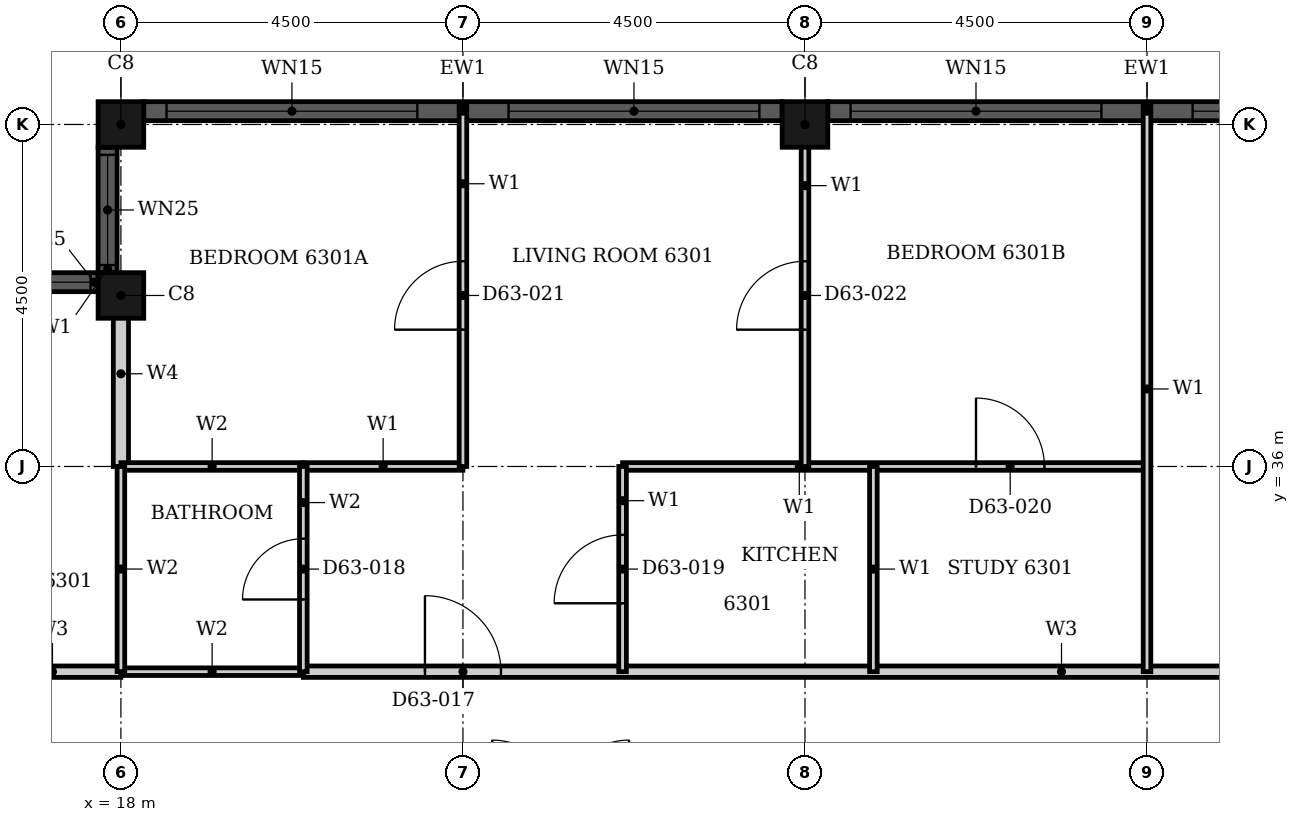
"""IFC4 building model, lengths in metres.
Left out: names, types, materials, properties, quantities, classifications, styles, units other than length and angle.
Written with IfcOpenShell. Run it as: python <this file> out.ifc"""

import sys

from ifc_helpers import new_model, si_unit, direction, frame, frame_2d, origin, origin_2d, place, context, subcontext, project, spatial, rectangle, hollow_rectangle, extrude, element, fill, save


model = new_model("IFC4")
c1 = context("Model", 3, precision=1e-05, world=origin(), true_north=direction((0.0, 1.0)))
c2 = subcontext(c1, "Body", "Model", "MODEL_VIEW")
j1 = project(units=[si_unit("LENGTHUNIT", "METRE"), si_unit("PLANEANGLEUNIT", "RADIAN")], contexts=[c1])
p1 = place(None, origin())
s1 = spatial("IfcSite", under=j1, at=p1, CompositionType="ELEMENT")
p2 = place(p1, origin())
s2 = spatial("IfcBuilding", under=s1, at=p2, CompositionType="ELEMENT")
p3 = place(p2, frame((0.0, 0.0, 249.0)))
s3 = spatial("IfcBuildingStorey", under=s2, at=p3, CompositionType="ELEMENT", Elevation=249.0)
for number, where, z_axis, x_axis in (
    (1, (27.0, 40.5, 0.0), (0.0, 0.0, 1.0), (1.0, 0.0, 0.0)),
    (2, (18.0, 40.5, 0.0), (0.0, 0.0, 1.0), (1.0, 0.0, 0.0)),
    (3, (18.0, 38.25, 0.0), (0.0, 0.0, 1.0), (1.0, 0.0, 0.0)),
):
    element("IfcColumn", number, at=place(p3, frame(where, z_axis=z_axis, x_axis=x_axis)), inside=s3, PredefinedType="COLUMN", context=c2, shape_type="SweptSolid", body=[
        extrude(hollow_rectangle(XDim=0.6, YDim=0.6, WallThickness=0.02, at=origin_2d()), origin(), (0.0, 0.0, 1.0), 3.7),
    ])
p4 = place(p3, frame((35.7, 40.675, 0.0), z_axis=(0.0, 0.0, 1.0), x_axis=(-1.0, 0.0, 0.0)))
e4 = element("IfcWall", 4, at=p4, inside=s3, PredefinedType="SOLIDWALL", context=c2, shape_type="SweptSolid", body=[
    extrude(rectangle(XDim=8.4, YDim=0.25, at=frame_2d((4.2, 0.0))), origin(), (0.0, 0.0, 1.0), 3.7),
])
p5 = place(p4, frame((0.3, 0.0, 0.45)))
e5 = element("IfcOpeningElement", 5, at=p5, cuts=e4, PredefinedType="OPENING", context=c2, shape_type="SweptSolid", body=[
    extrude(rectangle(XDim=3.3, YDim=2.3, at=frame_2d((1.65, 1.15))), frame((0.0, 0.135, 0.0), z_axis=(0.0, -1.0, 0.0), x_axis=(1.0, 0.0, 0.0)), (0.0, 0.0, 1.0), 0.27),
])
p6 = place(p4, frame((4.8, 0.0, 0.45)))
e6 = element("IfcOpeningElement", 6, at=p6, cuts=e4, PredefinedType="OPENING", context=c2, shape_type="SweptSolid", body=[
    extrude(rectangle(XDim=3.3, YDim=2.3, at=frame_2d((1.65, 1.15))), frame((0.0, 0.135, 0.0), z_axis=(0.0, -1.0, 0.0), x_axis=(1.0, 0.0, 0.0)), (0.0, 0.0, 1.0), 0.27),
])
p7 = place(p3, frame((26.7, 40.675, 0.0), z_axis=(0.0, 0.0, 1.0), x_axis=(-1.0, 0.0, 0.0)))
e7 = element("IfcWall", 7, at=p7, inside=s3, PredefinedType="SOLIDWALL", context=c2, shape_type="SweptSolid", body=[
    extrude(rectangle(XDim=8.4, YDim=0.25, at=frame_2d((4.2, 0.0))), origin(), (0.0, 0.0, 1.0), 3.7),
])
p8 = place(p7, frame((0.3, 0.0, 0.45)))
e8 = element("IfcOpeningElement", 8, at=p8, cuts=e7, PredefinedType="OPENING", context=c2, shape_type="SweptSolid", body=[
    extrude(rectangle(XDim=3.3, YDim=2.3, at=frame_2d((1.65, 1.15))), frame((0.0, 0.135, 0.0), z_axis=(0.0, -1.0, 0.0), x_axis=(1.0, 0.0, 0.0)), (0.0, 0.0, 1.0), 0.27),
])
p9 = place(p7, frame((4.8, 0.0, 0.45)))
e9 = element("IfcOpeningElement", 9, at=p9, cuts=e7, PredefinedType="OPENING", context=c2, shape_type="SweptSolid", body=[
    extrude(rectangle(XDim=3.3, YDim=2.3, at=frame_2d((1.65, 1.15))), frame((0.0, 0.135, 0.0), z_axis=(0.0, -1.0, 0.0), x_axis=(1.0, 0.0, 0.0)), (0.0, 0.0, 1.0), 0.27),
])
p10 = place(p3, frame((17.825, 40.2, 0.0), z_axis=(0.0, 0.0, 1.0), x_axis=(0.0, -1.0, 0.0)))
e10 = element("IfcWall", 10, at=p10, inside=s3, PredefinedType="SOLIDWALL", context=c2, shape_type="SweptSolid", body=[
    extrude(rectangle(XDim=1.65, YDim=0.25, at=frame_2d((0.825, 0.0))), origin(), (0.0, 0.0, 1.0), 3.7),
])
p11 = place(p10, frame((0.1, 0.0, 0.9)))
e11 = element("IfcOpeningElement", 11, at=p11, cuts=e10, PredefinedType="OPENING", context=c2, shape_type="SweptSolid", body=[
    extrude(rectangle(XDim=1.45, YDim=1.85, at=frame_2d((0.725, 0.925))), frame((0.0, 0.135, 0.0), z_axis=(0.0, -1.0, 0.0), x_axis=(1.0, 0.0, 0.0)), (0.0, 0.0, 1.0), 0.27),
])
p12 = place(p3, frame((17.7, 38.425, 0.0), z_axis=(0.0, 0.0, 1.0), x_axis=(-1.0, 0.0, 0.0)))
e12 = element("IfcWall", 12, at=p12, inside=s3, PredefinedType="SOLIDWALL", context=c2, shape_type="SweptSolid", body=[
    extrude(rectangle(XDim=1.65, YDim=0.25, at=frame_2d((0.825, 0.0))), origin(), (0.0, 0.0, 1.0), 3.7),
])
p13 = place(p12, frame((0.1, 0.0, 0.9)))
e13 = element("IfcOpeningElement", 13, at=p13, cuts=e12, PredefinedType="OPENING", context=c2, shape_type="SweptSolid", body=[
    extrude(rectangle(XDim=1.45, YDim=1.85, at=frame_2d((0.725, 0.925))), frame((0.0, 0.135, 0.0), z_axis=(0.0, -1.0, 0.0), x_axis=(1.0, 0.0, 0.0)), (0.0, 0.0, 1.0), 0.27),
])
p14 = place(p3, frame((20.4, 33.3, 0.0), z_axis=(0.0, 0.0, 1.0), x_axis=(1.0, 0.0, 0.0)))
e14 = element("IfcWall", 14, at=p14, inside=s3, PredefinedType="PARTITIONING", context=c2, shape_type="SweptSolid", body=[
    extrude(rectangle(XDim=24.6, YDim=0.15, at=frame_2d((12.3, 0.0))), origin(), (0.0, 0.0, 1.0), 3.4),
])
p15 = place(p14, frame((1.6, 0.0, 0.0)))
e15 = element("IfcOpeningElement", 15, at=p15, cuts=e14, PredefinedType="OPENING", context=c2, shape_type="SweptSolid", body=[
    extrude(rectangle(XDim=1.0, YDim=2.2, at=frame_2d((0.5, 1.1))), frame((0.0, 0.085, 0.0), z_axis=(0.0, -1.0, 0.0), x_axis=(1.0, 0.0, 0.0)), (0.0, 0.0, 1.0), 0.17),
])
p16 = place(p14, frame((17.35, 0.0, 0.0)))
e16 = element("IfcOpeningElement", 16, at=p16, cuts=e14, PredefinedType="OPENING", context=c2, shape_type="SweptSolid", body=[
    extrude(rectangle(XDim=1.0, YDim=2.1, at=frame_2d((0.5, 1.05))), frame((0.0, 0.085, 0.0), z_axis=(0.0, -1.0, 0.0), x_axis=(1.0, 0.0, 0.0)), (0.0, 0.0, 1.0), 0.17),
])
p17 = place(p3, frame((16.2, 33.3, 0.0), z_axis=(0.0, 0.0, 1.0), x_axis=(1.0, 0.0, 0.0)))
e17 = element("IfcWall", 17, at=p17, inside=s3, PredefinedType="PARTITIONING", context=c2, shape_type="SweptSolid", body=[
    extrude(rectangle(XDim=1.799, YDim=0.15, at=frame_2d((0.899, 0.0))), origin(), (0.0, 0.0, 1.0), 3.4),
])
p18 = place(p3, frame((20.4, 36.0, 0.0), z_axis=(0.0, 0.0, 1.0), x_axis=(1.0, 0.0, 0.0)))
e18 = element("IfcWall", 18, at=p18, inside=s3, PredefinedType="PARTITIONING", context=c2, shape_type="SweptSolid", body=[
    extrude(rectangle(XDim=2.1, YDim=0.1, at=frame_2d((1.05, 0.0))), origin(), (0.0, 0.0, 1.0), 3.4),
])
p19 = place(p3, frame((24.6, 36.0, 0.0), z_axis=(0.0, 0.0, 1.0), x_axis=(1.0, 0.0, 0.0)))
e19 = element("IfcWall", 19, at=p19, inside=s3, PredefinedType="PARTITIONING", context=c2, shape_type="SweptSolid", body=[
    extrude(rectangle(XDim=6.9, YDim=0.1, at=frame_2d((3.45, 0.0))), origin(), (0.0, 0.0, 1.0), 3.4),
])
p20 = place(p19, frame((4.65, 0.0, 0.0)))
e20 = element("IfcOpeningElement", 20, at=p20, cuts=e19, PredefinedType="OPENING", context=c2, shape_type="SweptSolid", body=[
    extrude(rectangle(XDim=0.9, YDim=2.1, at=frame_2d((0.45, 1.05))), frame((0.0, 0.06, 0.0), z_axis=(0.0, -1.0, 0.0), x_axis=(1.0, 0.0, 0.0)), (0.0, 0.0, 1.0), 0.12),
])
p21 = place(p3, frame((22.5, 36.0, 0.0), z_axis=(0.0, 0.0, 1.0), x_axis=(0.0, 1.0, 0.0)))
e21 = element("IfcWall", 21, at=p21, inside=s3, PredefinedType="PARTITIONING", context=c2, shape_type="SweptSolid", body=[
    extrude(rectangle(XDim=4.74, YDim=0.1, at=frame_2d((2.37, 0.0))), origin(), (0.0, 0.0, 1.0), 3.4),
])
p22 = place(p21, frame((1.8, 0.0, 0.0)))
e22 = element("IfcOpeningElement", 22, at=p22, cuts=e21, PredefinedType="OPENING", context=c2, shape_type="SweptSolid", body=[
    extrude(rectangle(XDim=0.9, YDim=2.1, at=frame_2d((0.45, 1.05))), frame((0.0, 0.06, 0.0), z_axis=(0.0, -1.0, 0.0), x_axis=(1.0, 0.0, 0.0)), (0.0, 0.0, 1.0), 0.12),
])
p23 = place(p3, frame((24.6, 33.3, 0.0), z_axis=(0.0, 0.0, 1.0), x_axis=(0.0, 1.0, 0.0)))
e23 = element("IfcWall", 23, at=p23, inside=s3, PredefinedType="PARTITIONING", context=c2, shape_type="SweptSolid", body=[
    extrude(rectangle(XDim=2.7, YDim=0.1, at=frame_2d((1.35, 0.0))), origin(), (0.0, 0.0, 1.0), 3.4),
])
p24 = place(p23, frame((0.9, 0.0, 0.0)))
e24 = element("IfcOpeningElement", 24, at=p24, cuts=e23, PredefinedType="OPENING", context=c2, shape_type="SweptSolid", body=[
    extrude(rectangle(XDim=0.9, YDim=2.1, at=frame_2d((0.45, 1.05))), frame((0.0, 0.06, 0.0), z_axis=(0.0, -1.0, 0.0), x_axis=(1.0, 0.0, 0.0)), (0.0, 0.0, 1.0), 0.12),
])
p25 = place(p3, frame((27.0, 36.0, 0.0), z_axis=(0.0, 0.0, 1.0), x_axis=(0.0, 1.0, 0.0)))
e25 = element("IfcWall", 25, at=p25, inside=s3, PredefinedType="PARTITIONING", context=c2, shape_type="SweptSolid", body=[
    extrude(rectangle(XDim=4.69, YDim=0.1, at=frame_2d((2.345, 0.0))), origin(), (0.0, 0.0, 1.0), 3.4),
])
p26 = place(p25, frame((1.8, 0.0, 0.0)))
e26 = element("IfcOpeningElement", 26, at=p26, cuts=e25, PredefinedType="OPENING", context=c2, shape_type="SweptSolid", body=[
    extrude(rectangle(XDim=0.9, YDim=2.1, at=frame_2d((0.45, 1.05))), frame((0.0, 0.06, 0.0), z_axis=(0.0, -1.0, 0.0), x_axis=(1.0, 0.0, 0.0)), (0.0, 0.0, 1.0), 0.12),
])
p27 = place(p3, frame((27.9, 33.3, 0.0), z_axis=(0.0, 0.0, 1.0), x_axis=(0.0, 1.0, 0.0)))
e27 = element("IfcWall", 27, at=p27, inside=s3, PredefinedType="PARTITIONING", context=c2, shape_type="SweptSolid", body=[
    extrude(rectangle(XDim=2.7, YDim=0.1, at=frame_2d((1.35, 0.0))), origin(), (0.0, 0.0, 1.0), 3.4),
])
p28 = place(p3, frame((31.5, 33.3, 0.0), z_axis=(0.0, 0.0, 1.0), x_axis=(0.0, 1.0, 0.0)))
e28 = element("IfcWall", 28, at=p28, inside=s3, PredefinedType="PARTITIONING", context=c2, shape_type="SweptSolid", body=[
    extrude(rectangle(XDim=7.44, YDim=0.1, at=frame_2d((3.72, 0.0))), origin(), (0.0, 0.0, 1.0), 3.4),
])
p29 = place(p3, frame((18.0, 36.0, 0.0), z_axis=(0.0, 0.0, 1.0), x_axis=(0.0, 1.0, 0.0)))
e29 = element("IfcWall", 29, at=p29, inside=s3, PredefinedType="PARTITIONING", context=c2, shape_type="SweptSolid", body=[
    extrude(rectangle(XDim=2.44, YDim=0.2, at=frame_2d((1.22, 0.0))), origin(), (0.0, 0.0, 1.0), 3.4),
])
for number, where, z_axis, x_axis in (
    (30, (18.0, 33.3, 0.0), (0.0, 0.0, 1.0), (1.0, 0.0, 0.0)),
    (31, (18.0, 36.0, 0.0), (0.0, 0.0, 1.0), (1.0, 0.0, 0.0)),
):
    element("IfcWall", number, at=place(p3, frame(where, z_axis=z_axis, x_axis=x_axis)), inside=s3, PredefinedType="PARTITIONING", context=c2, shape_type="SweptSolid", body=[
        extrude(rectangle(XDim=2.4, YDim=0.1, at=frame_2d((1.2, 0.0))), origin(), (0.0, 0.0, 1.0), 3.4),
    ])
p30 = place(p3, frame((18.0, 33.301, 0.0), z_axis=(0.0, 0.0, 1.0), x_axis=(0.0, 1.0, 0.0)))
e32 = element("IfcWall", 32, at=p30, inside=s3, PredefinedType="PARTITIONING", context=c2, shape_type="SweptSolid", body=[
    extrude(rectangle(XDim=2.699, YDim=0.1, at=frame_2d((1.35, 0.0))), origin(), (0.0, 0.0, 1.0), 3.4),
])
p31 = place(p3, frame((20.4, 33.3, 0.0), z_axis=(0.0, 0.0, 1.0), x_axis=(0.0, 1.0, 0.0)))
e33 = element("IfcWall", 33, at=p31, inside=s3, PredefinedType="PARTITIONING", context=c2, shape_type="SweptSolid", body=[
    extrude(rectangle(XDim=2.7, YDim=0.1, at=frame_2d((1.35, 0.0))), origin(), (0.0, 0.0, 1.0), 3.4),
])
p32 = place(p31, frame((0.95, 0.0, 0.0)))
e34 = element("IfcOpeningElement", 34, at=p32, cuts=e33, PredefinedType="OPENING", context=c2, shape_type="SweptSolid", body=[
    extrude(rectangle(XDim=0.8, YDim=2.1, at=frame_2d((0.4, 1.05))), frame((0.0, 0.06, 0.0), z_axis=(0.0, -1.0, 0.0), x_axis=(1.0, 0.0, 0.0)), (0.0, 0.0, 1.0), 0.12),
])
p33 = place(p5, origin())
e35 = element("IfcWindow", 35, at=p33, inside=s3, PartitioningType="SINGLE_PANEL", PredefinedType="WINDOW", context=c2, shape_type="SweptSolid", body=[
    extrude(rectangle(XDim=3.3, YDim=2.3, at=frame_2d((1.65, 1.15))), frame((0.0, 0.03, 0.0), z_axis=(0.0, -1.0, 0.0), x_axis=(1.0, 0.0, 0.0)), (0.0, 0.0, 1.0), 0.06),
])
fill(e5, e35)
p34 = place(p6, origin())
e36 = element("IfcWindow", 36, at=p34, inside=s3, PartitioningType="SINGLE_PANEL", PredefinedType="WINDOW", context=c2, shape_type="SweptSolid", body=[
    extrude(rectangle(XDim=3.3, YDim=2.3, at=frame_2d((1.65, 1.15))), frame((0.0, 0.03, 0.0), z_axis=(0.0, -1.0, 0.0), x_axis=(1.0, 0.0, 0.0)), (0.0, 0.0, 1.0), 0.06),
])
fill(e6, e36)
p35 = place(p8, origin())
e37 = element("IfcWindow", 37, at=p35, inside=s3, PartitioningType="SINGLE_PANEL", PredefinedType="WINDOW", context=c2, shape_type="SweptSolid", body=[
    extrude(rectangle(XDim=3.3, YDim=2.3, at=frame_2d((1.65, 1.15))), frame((0.0, 0.03, 0.0), z_axis=(0.0, -1.0, 0.0), x_axis=(1.0, 0.0, 0.0)), (0.0, 0.0, 1.0), 0.06),
])
fill(e8, e37)
p36 = place(p9, origin())
e38 = element("IfcWindow", 38, at=p36, inside=s3, PartitioningType="SINGLE_PANEL", PredefinedType="WINDOW", context=c2, shape_type="SweptSolid", body=[
    extrude(rectangle(XDim=3.3, YDim=2.3, at=frame_2d((1.65, 1.15))), frame((0.0, 0.03, 0.0), z_axis=(0.0, -1.0, 0.0), x_axis=(1.0, 0.0, 0.0)), (0.0, 0.0, 1.0), 0.06),
])
fill(e9, e38)
p37 = place(p11, origin())
e39 = element("IfcWindow", 39, at=p37, inside=s3, PartitioningType="SINGLE_PANEL", PredefinedType="WINDOW", context=c2, shape_type="SweptSolid", body=[
    extrude(rectangle(XDim=1.45, YDim=1.85, at=frame_2d((0.725, 0.925))), frame((0.0, 0.03, 0.0), z_axis=(0.0, -1.0, 0.0), x_axis=(1.0, 0.0, 0.0)), (0.0, 0.0, 1.0), 0.06),
])
fill(e11, e39)
p38 = place(p13, origin())
e40 = element("IfcWindow", 40, at=p38, inside=s3, PartitioningType="SINGLE_PANEL", PredefinedType="WINDOW", context=c2, shape_type="SweptSolid", body=[
    extrude(rectangle(XDim=1.45, YDim=1.85, at=frame_2d((0.725, 0.925))), frame((0.0, 0.03, 0.0), z_axis=(0.0, -1.0, 0.0), x_axis=(1.0, 0.0, 0.0)), (0.0, 0.0, 1.0), 0.06),
])
fill(e13, e40)
p39 = place(p15, origin())
e41 = element("IfcDoor", 41, at=p39, inside=s3, OperationType="SINGLE_SWING_LEFT", PredefinedType="DOOR", context=c2, shape_type="SweptSolid", body=[
    extrude(rectangle(XDim=1.0, YDim=2.2, at=frame_2d((0.5, 1.1))), frame((0.0, 0.025, 0.0), z_axis=(0.0, -1.0, 0.0), x_axis=(1.0, 0.0, 0.0)), (0.0, 0.0, 1.0), 0.05),
])
fill(e15, e41)
p40 = place(p32, origin())
e42 = element("IfcDoor", 42, at=p40, inside=s3, OperationType="SINGLE_SWING_LEFT", PredefinedType="DOOR", context=c2, shape_type="SweptSolid", body=[
    extrude(rectangle(XDim=0.8, YDim=2.1, at=frame_2d((0.4, 1.05))), frame((0.0, 0.025, 0.0), z_axis=(0.0, -1.0, 0.0), x_axis=(1.0, 0.0, 0.0)), (0.0, 0.0, 1.0), 0.05),
])
fill(e34, e42)
p41 = place(p24, origin())
e43 = element("IfcDoor", 43, at=p41, inside=s3, OperationType="SINGLE_SWING_RIGHT", PredefinedType="DOOR", context=c2, shape_type="SweptSolid", body=[
    extrude(rectangle(XDim=0.9, YDim=2.1, at=frame_2d((0.45, 1.05))), frame((0.0, 0.025, 0.0), z_axis=(0.0, -1.0, 0.0), x_axis=(1.0, 0.0, 0.0)), (0.0, 0.0, 1.0), 0.05),
])
fill(e24, e43)
p42 = place(p20, origin())
e44 = element("IfcDoor", 44, at=p42, inside=s3, OperationType="SINGLE_SWING_LEFT", PredefinedType="DOOR", context=c2, shape_type="SweptSolid", body=[
    extrude(rectangle(XDim=0.9, YDim=2.1, at=frame_2d((0.45, 1.05))), frame((0.0, 0.025, 0.0), z_axis=(0.0, -1.0, 0.0), x_axis=(1.0, 0.0, 0.0)), (0.0, 0.0, 1.0), 0.05),
])
fill(e20, e44)
p43 = place(p22, origin())
e45 = element("IfcDoor", 45, at=p43, inside=s3, OperationType="SINGLE_SWING_RIGHT", PredefinedType="DOOR", context=c2, shape_type="SweptSolid", body=[
    extrude(rectangle(XDim=0.9, YDim=2.1, at=frame_2d((0.45, 1.05))), frame((0.0, 0.025, 0.0), z_axis=(0.0, -1.0, 0.0), x_axis=(1.0, 0.0, 0.0)), (0.0, 0.0, 1.0), 0.05),
])
fill(e22, e45)
p44 = place(p26, origin())
e46 = element("IfcDoor", 46, at=p44, inside=s3, OperationType="SINGLE_SWING_LEFT", PredefinedType="DOOR", context=c2, shape_type="SweptSolid", body=[
    extrude(rectangle(XDim=0.9, YDim=2.1, at=frame_2d((0.45, 1.05))), frame((0.0, 0.025, 0.0), z_axis=(0.0, -1.0, 0.0), x_axis=(1.0, 0.0, 0.0)), (0.0, 0.0, 1.0), 0.05),
])
fill(e26, e46)
save(model, sys.argv[1])
